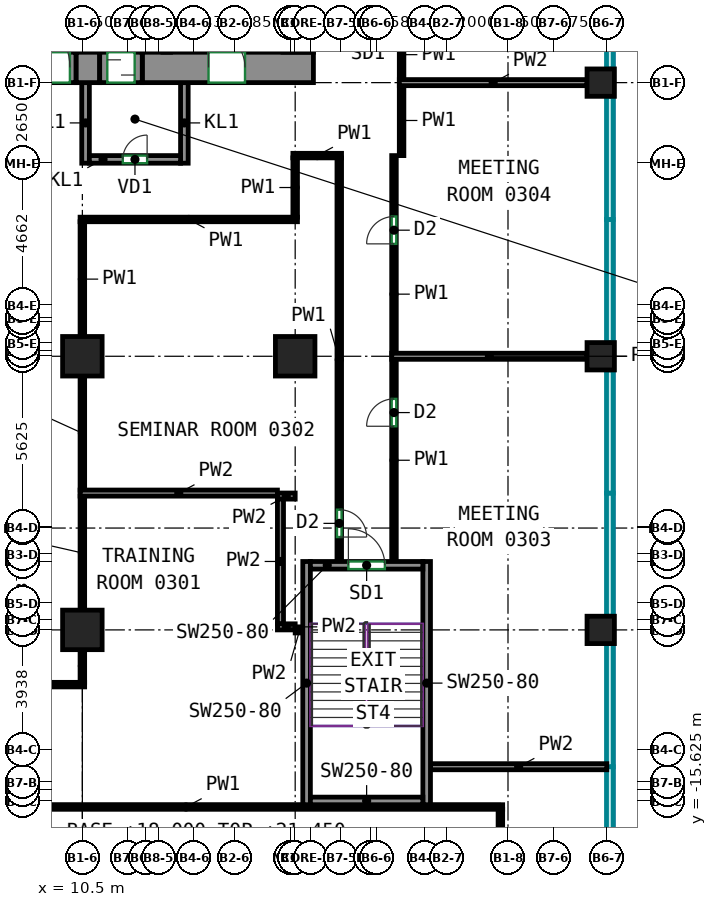
"""IFC4 building model, lengths in metres.
Left out: names, types, materials, properties, quantities, classifications, styles, units other than length and angle.
Written with IfcOpenShell. Run it as: python <this file> out.ifc"""

import sys

from ifc_helpers import new_model, si_unit, direction, frame, frame_2d, origin, origin_2d, place, context, subcontext, project, spatial, rectangle, extrude, source, transform, mapped, element, fill, save


model = new_model("IFC4")
c1 = context("Model", 3, precision=1e-05, world=origin(), true_north=direction((0.0, 1.0)))
c2 = subcontext(c1, "Body", "Model", "MODEL_VIEW")
j1 = project(units=[si_unit("LENGTHUNIT", "METRE"), si_unit("PLANEANGLEUNIT", "RADIAN")], contexts=[c1])
p1 = place(None, origin())
s1 = spatial("IfcSite", under=j1, at=p1, CompositionType="ELEMENT")
p2 = place(p1, origin())
s2 = spatial("IfcBuilding", under=s1, at=p2, CompositionType="ELEMENT")
p3 = place(p2, frame((0.0, 0.0, 18.0)))
s3 = spatial("IfcBuildingStorey", under=s2, at=p3, CompositionType="ELEMENT", Elevation=18.0)
m1 = source(origin(), c2, "Body", "SweptSolid", [
    extrude(rectangle(XDim=1.3, YDim=1.3, at=origin_2d()), origin(), (0.0, 0.0, 1.0), 4.1),
])
for number, where, z_axis, x_axis in (
    (1, (10.5, -10.0, 0.0), (0.0, 0.0, 1.0), (1.0, 0.0, 0.0)),
    (2, (10.5, -1.0, 0.0), (0.0, 0.0, 1.0), (1.0, 0.0, 0.0)),
    (3, (17.5, -1.0, 0.0), (0.0, 0.0, 1.0), (1.0, 0.0, 0.0)),
):
    element("IfcColumn", number, at=place(p3, frame(where, z_axis=z_axis, x_axis=x_axis)), inside=s3, PredefinedType="COLUMN", context=c2, shape_type="MappedRepresentation", body=[
        mapped(m1, transform((0.0, 0.0, 0.0))),
    ])
m2 = source(origin(), c2, "Body", "SweptSolid", [
    extrude(rectangle(XDim=0.9, YDim=0.9, at=origin_2d()), origin(), (0.0, 0.0, 1.0), 4.1),
])
for number, where, z_axis, x_axis in (
    (4, (27.55, -10.0, 0.0), (0.0, 0.0, 1.0), (1.0, 0.0, 0.0)),
    (5, (27.55, -1.0, 0.0), (0.0, 0.0, 1.0), (1.0, 0.0, 0.0)),
    (6, (27.55, 8.0, 0.0), (0.0, 0.0, 1.0), (1.0, 0.0, 0.0)),
):
    element("IfcColumn", number, at=place(p3, frame(where, z_axis=z_axis, x_axis=x_axis)), inside=s3, PredefinedType="COLUMN", context=c2, shape_type="MappedRepresentation", body=[
        mapped(m2, transform((0.0, 0.0, 0.0))),
    ])
m3 = source(origin(), c2, "Body", "SweptSolid", [
    extrude(rectangle(XDim=0.78, YDim=1.0, at=frame_2d((0.39, 0.0))), origin(), (0.0, 0.0, 1.0), 4.1),
])
p4 = place(p3, frame((10.29, 8.5, 0.0), z_axis=(0.0, 0.0, 1.0), x_axis=(1.0, 0.0, 0.0)))
e7 = element("IfcWall", 7, at=p4, inside=s3, PredefinedType="SHEAR", context=c2, shape_type="MappedRepresentation", body=[
    mapped(m3, transform((0.0, 0.0, 0.0))),
])
m4 = source(origin(), c2, "Body", "SweptSolid", [
    extrude(rectangle(XDim=5.63, YDim=1.0, at=frame_2d((2.815, 0.0))), origin(), (0.0, 0.0, 1.0), 4.1),
])
p5 = place(p3, frame((12.47, 8.5, 0.0), z_axis=(0.0, 0.0, 1.0), x_axis=(1.0, 0.0, 0.0)))
e8 = element("IfcWall", 8, at=p5, inside=s3, PredefinedType="SHEAR", context=c2, shape_type="MappedRepresentation", body=[
    mapped(m4, transform((0.0, 0.0, 0.0))),
])
p6 = place(p5, frame((2.18, 0.0, 0.0)))
e9 = element("IfcOpeningElement", 9, at=p6, cuts=e8, PredefinedType="OPENING", context=c2, shape_type="SweptSolid", body=[
    extrude(rectangle(XDim=1.2, YDim=2.1, at=frame_2d((0.6, 1.05))), frame((0.0, 0.51, 0.0), z_axis=(0.0, -1.0, 0.0), x_axis=(1.0, 0.0, 0.0)), (0.0, 0.0, 1.0), 1.02),
])
m5 = source(origin(), c2, "Body", "SweptSolid", [
    extrude(rectangle(XDim=8.0, YDim=0.25, at=frame_2d((4.0, 0.0))), origin(), (0.0, 0.0, 1.0), 4.1),
])
for number, where, z_axis, x_axis in (
    (10, (17.875, -15.75, 0.0), (0.0, 0.0, 1.0), (0.0, 1.0, 0.0)),
    (11, (21.825, -15.75, 0.0), (0.0, 0.0, 1.0), (0.0, 1.0, 0.0)),
):
    element("IfcWall", number, at=place(p3, frame(where, z_axis=z_axis, x_axis=x_axis)), inside=s3, PredefinedType="SHEAR", context=c2, shape_type="MappedRepresentation", body=[
        mapped(m5, transform((0.0, 0.0, 0.0))),
    ])
m6 = source(origin(), c2, "Body", "SweptSolid", [
    extrude(rectangle(XDim=3.7, YDim=0.25, at=frame_2d((1.85, 0.0))), origin(), (0.0, 0.0, 1.0), 4.1),
])
p7 = place(p3, frame((18.0, -15.625, 0.0), z_axis=(0.0, 0.0, 1.0), x_axis=(1.0, 0.0, 0.0)))
e12 = element("IfcWall", 12, at=p7, inside=s3, PredefinedType="SHEAR", context=c2, shape_type="MappedRepresentation", body=[
    mapped(m6, transform((0.0, 0.0, 0.0))),
])
p8 = place(p3, frame((18.0, -7.875, 0.0), z_axis=(0.0, 0.0, 1.0), x_axis=(1.0, 0.0, 0.0)))
e13 = element("IfcWall", 13, at=p8, inside=s3, PredefinedType="SHEAR", context=c2, shape_type="MappedRepresentation", body=[
    mapped(m6, transform((0.0, 0.0, 0.0))),
])
p9 = place(p8, frame((1.25, 0.0, 0.0)))
e14 = element("IfcOpeningElement", 14, at=p9, cuts=e13, PredefinedType="OPENING", context=c2, shape_type="SweptSolid", body=[
    extrude(rectangle(XDim=1.2, YDim=2.1, at=frame_2d((0.6, 1.05))), frame((0.0, 0.135, 0.0), z_axis=(0.0, -1.0, 0.0), x_axis=(1.0, 0.0, 0.0)), (0.0, 0.0, 1.0), 0.27),
])
m7 = source(origin(), c2, "Body", "SweptSolid", [
    extrude(rectangle(XDim=2.65, YDim=0.25, at=frame_2d((1.325, 0.0))), origin(), (0.0, 0.0, 1.0), 4.1),
])
for number, where, z_axis, x_axis in (
    (15, (10.605, 5.35, 0.0), (0.0, 0.0, 1.0), (0.0, 1.0, 0.0)),
    (16, (13.855, 5.35, 0.0), (0.0, 0.0, 1.0), (0.0, 1.0, 0.0)),
):
    element("IfcWall", number, at=place(p3, frame(where, z_axis=z_axis, x_axis=x_axis)), inside=s3, PredefinedType="PARTITIONING", context=c2, shape_type="MappedRepresentation", body=[
        mapped(m7, transform((0.0, 0.0, 0.0))),
    ])
m8 = source(origin(), c2, "Body", "SweptSolid", [
    extrude(rectangle(XDim=3.0, YDim=0.25, at=frame_2d((1.5, 0.0))), origin(), (0.0, 0.0, 1.0), 4.1),
])
p10 = place(p3, frame((10.73, 5.475, 0.0), z_axis=(0.0, 0.0, 1.0), x_axis=(1.0, 0.0, 0.0)))
e17 = element("IfcWall", 17, at=p10, inside=s3, PredefinedType="PARTITIONING", context=c2, shape_type="MappedRepresentation", body=[
    mapped(m8, transform((0.0, 0.0, 0.0))),
])
p11 = place(p10, frame((1.1, 0.0, 0.0)))
e18 = element("IfcOpeningElement", 18, at=p11, cuts=e17, PredefinedType="OPENING", context=c2, shape_type="SweptSolid", body=[
    extrude(rectangle(XDim=0.8, YDim=2.0, at=frame_2d((0.4, 1.0))), frame((0.0, 0.135, 0.0), z_axis=(0.0, -1.0, 0.0), x_axis=(1.0, 0.0, 0.0)), (0.0, 0.0, 1.0), 0.27),
])
m9 = source(origin(), c2, "Body", "SweptSolid", [
    extrude(rectangle(XDim=2.4, YDim=1.0, at=frame_2d((1.2, 0.0))), origin(), (0.0, 0.0, 1.0), 2.7),
])
p12 = place(p3, frame((7.89, 8.5, 0.0), z_axis=(0.0, 0.0, 1.0), x_axis=(1.0, 0.0, 0.0)))
e19 = element("IfcWall", 19, at=p12, inside=s3, PredefinedType="PARTITIONING", context=c2, shape_type="MappedRepresentation", body=[
    mapped(m9, transform((0.0, 0.0, 0.0))),
])
p13 = place(p12, frame((0.2, 0.0, 0.0)))
e20 = element("IfcOpeningElement", 20, at=p13, cuts=e19, PredefinedType="OPENING", context=c2, shape_type="SweptSolid", body=[
    extrude(rectangle(XDim=2.0, YDim=2.1, at=frame_2d((1.0, 1.05))), frame((0.0, 0.51, 0.0), z_axis=(0.0, -1.0, 0.0), x_axis=(1.0, 0.0, 0.0)), (0.0, 0.0, 1.0), 1.02),
])
m10 = source(origin(), c2, "Body", "SweptSolid", [
    extrude(rectangle(XDim=1.4, YDim=1.0, at=frame_2d((0.7, 0.0))), origin(), (0.0, 0.0, 1.0), 2.7),
])
p14 = place(p3, frame((11.07, 8.5, 0.0), z_axis=(0.0, 0.0, 1.0), x_axis=(1.0, 0.0, 0.0)))
e21 = element("IfcWall", 21, at=p14, inside=s3, PredefinedType="PARTITIONING", context=c2, shape_type="MappedRepresentation", body=[
    mapped(m10, transform((0.0, 0.0, 0.0))),
])
p15 = place(p14, frame((0.25, 0.0, 0.0)))
e22 = element("IfcOpeningElement", 22, at=p15, cuts=e21, PredefinedType="OPENING", context=c2, shape_type="SweptSolid", body=[
    extrude(rectangle(XDim=0.9, YDim=2.1, at=frame_2d((0.45, 1.05))), frame((0.0, 0.51, 0.0), z_axis=(0.0, -1.0, 0.0), x_axis=(1.0, 0.0, 0.0)), (0.0, 0.0, 1.0), 1.02),
])
p16 = place(p3, frame((-5.875, -11.8, 0.0), z_axis=(0.0, 0.0, 1.0), x_axis=(1.0, 0.0, 0.0)))
e23 = element("IfcWall", 23, at=p16, inside=s3, PredefinedType="PARTITIONING", context=c2, shape_type="SweptSolid", body=[
    extrude(rectangle(XDim=16.45, YDim=0.15, at=frame_2d((8.225, 0.0))), origin(), (0.0, 0.0, 1.0), 4.1),
])
p17 = place(p16, frame((0.811, 0.0, 0.0)))
e24 = element("IfcOpeningElement", 24, at=p17, cuts=e23, PredefinedType="OPENING", context=c2, shape_type="SweptSolid", body=[
    extrude(rectangle(XDim=0.9, YDim=2.1, at=frame_2d((0.45, 1.05))), frame((0.0, 0.085, 0.0), z_axis=(0.0, -1.0, 0.0), x_axis=(1.0, 0.0, 0.0)), (0.0, 0.0, 1.0), 0.17),
])
p18 = place(p16, frame((7.771, 0.0, 0.0)))
e25 = element("IfcOpeningElement", 25, at=p18, cuts=e23, PredefinedType="OPENING", context=c2, shape_type="SweptSolid", body=[
    extrude(rectangle(XDim=0.9, YDim=2.1, at=frame_2d((0.45, 1.05))), frame((0.0, 0.085, 0.0), z_axis=(0.0, -1.0, 0.0), x_axis=(1.0, 0.0, 0.0)), (0.0, 0.0, 1.0), 0.17),
])
p19 = place(p3, frame((10.5, -9.35, 0.0), z_axis=(0.0, 0.0, 1.0), x_axis=(0.0, 1.0, 0.0)))
e26 = element("IfcWall", 26, at=p19, inside=s3, PredefinedType="PARTITIONING", context=c2, shape_type="SweptSolid", body=[
    extrude(rectangle(XDim=3.76, YDim=0.15, at=frame_2d((1.88, 0.0))), origin(), (0.0, 0.0, 1.0), 3.45),
])
p20 = place(p3, frame((10.5, -11.725, 0.0), z_axis=(0.0, 0.0, 1.0), x_axis=(0.0, 1.0, 0.0)))
e27 = element("IfcWall", 27, at=p20, inside=s3, PredefinedType="PARTITIONING", context=c2, shape_type="SweptSolid", body=[
    extrude(rectangle(XDim=1.075, YDim=0.15, at=frame_2d((0.538, 0.0))), origin(), (0.0, 0.0, 1.0), 3.45),
])
p21 = place(p3, frame((3.49, -15.825, 0.0), z_axis=(0.0, 0.0, 1.0), x_axis=(1.0, 0.0, 0.0)))
e28 = element("IfcWall", 28, at=p21, inside=s3, PredefinedType="PARTITIONING", context=c2, shape_type="SweptSolid", body=[
    extrude(rectangle(XDim=20.835, YDim=0.15, at=frame_2d((10.417, 0.0))), origin(), (0.0, 0.0, 1.0), 4.1),
])
p22 = place(p21, frame((2.402, 0.0, 0.0)))
e29 = element("IfcOpeningElement", 29, at=p22, cuts=e28, PredefinedType="OPENING", context=c2, shape_type="SweptSolid", body=[
    extrude(rectangle(XDim=0.9, YDim=2.1, at=frame_2d((0.45, 1.05))), frame((0.0, 0.085, 0.0), z_axis=(0.0, -1.0, 0.0), x_axis=(1.0, 0.0, 0.0)), (0.0, 0.0, 1.0), 0.17),
])
p23 = place(p3, frame((24.25, -18.125, 0.0), z_axis=(0.0, 0.0, 1.0), x_axis=(0.0, 1.0, 0.0)))
e30 = element("IfcWall", 30, at=p23, inside=s3, PredefinedType="PARTITIONING", context=c2, shape_type="SweptSolid", body=[
    extrude(rectangle(XDim=2.225, YDim=0.15, at=frame_2d((1.113, 0.0))), origin(), (0.0, 0.0, 1.0), 3.45),
])
p24 = place(p3, frame((20.75, -7.75, 0.0), z_axis=(0.0, 0.0, 1.0), x_axis=(0.0, 1.0, 0.0)))
e31 = element("IfcWall", 31, at=p24, inside=s3, PredefinedType="PARTITIONING", context=c2, shape_type="SweptSolid", body=[
    extrude(rectangle(XDim=6.66, YDim=0.15, at=frame_2d((3.33, 0.0))), origin(), (0.0, 0.0, 1.0), 4.1),
])
p25 = place(p24, frame((4.448, 0.0, 0.0)))
e32 = element("IfcOpeningElement", 32, at=p25, cuts=e31, PredefinedType="OPENING", context=c2, shape_type="SweptSolid", body=[
    extrude(rectangle(XDim=0.9, YDim=2.1, at=frame_2d((0.45, 1.05))), frame((0.0, 0.085, 0.0), z_axis=(0.0, -1.0, 0.0), x_axis=(1.0, 0.0, 0.0)), (0.0, 0.0, 1.0), 0.17),
])
p26 = place(p3, frame((10.5, -0.35, 0.0), z_axis=(0.0, 0.0, 1.0), x_axis=(0.0, 1.0, 0.0)))
e33 = element("IfcWall", 33, at=p26, inside=s3, PredefinedType="PARTITIONING", context=c2, shape_type="SweptSolid", body=[
    extrude(rectangle(XDim=3.775, YDim=0.15, at=frame_2d((1.888, 0.0))), origin(), (0.0, 0.0, 1.0), 4.1),
])
p27 = place(p3, frame((10.5, -5.41, 0.0), z_axis=(0.0, 0.0, 1.0), x_axis=(0.0, 1.0, 0.0)))
e34 = element("IfcWall", 34, at=p27, inside=s3, PredefinedType="PARTITIONING", context=c2, shape_type="SweptSolid", body=[
    extrude(rectangle(XDim=3.76, YDim=0.15, at=frame_2d((1.88, 0.0))), origin(), (0.0, 0.0, 1.0), 3.45),
])
p28 = place(p3, frame((18.95, 5.525, 0.0), z_axis=(0.0, 0.0, 1.0), x_axis=(0.0, -1.0, 0.0)))
e35 = element("IfcWall", 35, at=p28, inside=s3, PredefinedType="PARTITIONING", context=c2, shape_type="SweptSolid", body=[
    extrude(rectangle(XDim=13.275, YDim=0.15, at=frame_2d((6.637, 0.0))), origin(), (0.0, 0.0, 1.0), 4.1),
])
p29 = place(p28, frame((11.571, 0.0, 0.0)))
e36 = element("IfcOpeningElement", 36, at=p29, cuts=e35, PredefinedType="OPENING", context=c2, shape_type="SweptSolid", body=[
    extrude(rectangle(XDim=0.9, YDim=2.1, at=frame_2d((0.45, 1.05))), frame((0.0, 0.085, 0.0), z_axis=(0.0, -1.0, 0.0), x_axis=(1.0, 0.0, 0.0)), (0.0, 0.0, 1.0), 0.17),
])
p30 = place(p3, frame((17.425, 5.6, 0.0), z_axis=(0.0, 0.0, 1.0), x_axis=(1.0, 0.0, 0.0)))
e37 = element("IfcWall", 37, at=p30, inside=s3, PredefinedType="PARTITIONING", context=c2, shape_type="SweptSolid", body=[
    extrude(rectangle(XDim=1.6, YDim=0.15, at=frame_2d((0.8, 0.0))), origin(), (0.0, 0.0, 1.0), 4.1),
])
p31 = place(p3, frame((17.5, 3.575, 0.0), z_axis=(0.0, 0.0, 1.0), x_axis=(0.0, 1.0, 0.0)))
e38 = element("IfcWall", 38, at=p31, inside=s3, PredefinedType="PARTITIONING", context=c2, shape_type="SweptSolid", body=[
    extrude(rectangle(XDim=1.95, YDim=0.15, at=frame_2d((0.975, 0.0))), origin(), (0.0, 0.0, 1.0), 4.1),
])
p32 = place(p3, frame((10.425, 3.5, 0.0), z_axis=(0.0, 0.0, 1.0), x_axis=(1.0, 0.0, 0.0)))
e39 = element("IfcWall", 39, at=p32, inside=s3, PredefinedType="PARTITIONING", context=c2, shape_type="SweptSolid", body=[
    extrude(rectangle(XDim=7.15, YDim=0.15, at=frame_2d((3.575, 0.0))), origin(), (0.0, 0.0, 1.0), 4.1),
])
p33 = place(p3, frame((21.0, 5.6, 0.0), z_axis=(0.0, 0.0, 1.0), x_axis=(0.0, 1.0, 0.0)))
e40 = element("IfcWall", 40, at=p33, inside=s3, PredefinedType="PARTITIONING", context=c2, shape_type="SweptSolid", body=[
    extrude(rectangle(XDim=2.31, YDim=0.15, at=frame_2d((1.155, 0.0))), origin(), (0.0, 0.0, 1.0), 4.1),
])
p34 = place(p3, frame((20.75, -0.91, 0.0), z_axis=(0.0, 0.0, 1.0), x_axis=(0.0, 1.0, 0.0)))
e41 = element("IfcWall", 41, at=p34, inside=s3, PredefinedType="PARTITIONING", context=c2, shape_type="SweptSolid", body=[
    extrude(rectangle(XDim=6.51, YDim=0.15, at=frame_2d((3.255, 0.0))), origin(), (0.0, 0.0, 1.0), 4.1),
])
p35 = place(p34, frame((3.607, 0.0, 0.0)))
e42 = element("IfcOpeningElement", 42, at=p35, cuts=e41, PredefinedType="OPENING", context=c2, shape_type="SweptSolid", body=[
    extrude(rectangle(XDim=0.9, YDim=2.1, at=frame_2d((0.45, 1.05))), frame((0.0, 0.085, 0.0), z_axis=(0.0, -1.0, 0.0), x_axis=(1.0, 0.0, 0.0)), (0.0, 0.0, 1.0), 0.17),
])
p36 = place(p3, frame((21.0, 8.09, 0.0), z_axis=(0.0, 0.0, 1.0), x_axis=(0.0, 1.0, 0.0)))
e43 = element("IfcWall", 43, at=p36, inside=s3, PredefinedType="PARTITIONING", context=c2, shape_type="SweptSolid", body=[
    extrude(rectangle(XDim=1.66, YDim=0.15, at=frame_2d((0.83, 0.0))), origin(), (0.0, 0.0, 1.0), 4.1),
])
p37 = place(p3, frame((10.426, -5.5, 0.0), z_axis=(0.0, 0.0, 1.0), x_axis=(1.0, 0.0, 0.0)))
e44 = element("IfcWall", 44, at=p37, inside=s3, PredefinedType="PARTITIONING", context=c2, shape_type="SweptSolid", body=[
    extrude(rectangle(XDim=6.49, YDim=0.2, at=frame_2d((3.245, 0.0))), origin(), (0.0, 0.0, 1.0), 4.1),
])
p38 = place(p3, frame((16.916, -5.598, 0.0), z_axis=(0.0, 0.0, 1.0), x_axis=(1.0, 0.0, 0.0)))
e45 = element("IfcWall", 45, at=p38, inside=s3, PredefinedType="PARTITIONING", context=c2, shape_type="SweptSolid", body=[
    extrude(rectangle(XDim=0.584, YDim=0.2, at=frame_2d((0.292, 0.0))), origin(), (0.0, 0.0, 1.0), 4.1),
])
p39 = place(p3, frame((17.016, -9.8, 0.0), z_axis=(0.0, 0.0, 1.0), x_axis=(0.0, 1.0, 0.0)))
e46 = element("IfcWall", 46, at=p39, inside=s3, PredefinedType="PARTITIONING", context=c2, shape_type="SweptSolid", body=[
    extrude(rectangle(XDim=4.102, YDim=0.2, at=frame_2d((2.051, 0.0))), origin(), (0.0, 0.0, 1.0), 4.1),
])
p40 = place(p3, frame((17.5, -9.9, 0.0), z_axis=(0.0, 0.0, 1.0), x_axis=(-1.0, 0.0, 0.0)))
e47 = element("IfcWall", 47, at=p40, inside=s3, PredefinedType="PARTITIONING", context=c2, shape_type="SweptSolid", body=[
    extrude(rectangle(XDim=0.584, YDim=0.2, at=frame_2d((0.292, 0.0))), origin(), (0.0, 0.0, 1.0), 4.1),
])
p41 = place(p3, frame((17.8, -10.0, 0.0), z_axis=(0.0, 0.0, 1.0), x_axis=(-1.0, 0.0, 0.0)))
e48 = element("IfcWall", 48, at=p41, inside=s3, PredefinedType="PARTITIONING", context=c2, shape_type="SweptSolid", body=[
    extrude(rectangle(XDim=0.3, YDim=0.2, at=frame_2d((0.15, 0.0))), origin(), (0.0, 0.0, 1.0), 4.1),
])
p42 = place(p3, frame((21.95, -14.5, 0.0), z_axis=(0.0, 0.0, 1.0), x_axis=(1.0, 0.0, 0.0)))
e49 = element("IfcWall", 49, at=p42, inside=s3, PredefinedType="PARTITIONING", context=c2, shape_type="SweptSolid", body=[
    extrude(rectangle(XDim=5.8, YDim=0.2, at=frame_2d((2.9, 0.0))), origin(), (0.0, 0.0, 1.0), 4.1),
])
p43 = place(p3, frame((27.1, -1.0, 0.0), z_axis=(0.0, 0.0, 1.0), x_axis=(-1.0, 0.0, 0.0)))
e50 = element("IfcWall", 50, at=p43, inside=s3, PredefinedType="PARTITIONING", context=c2, shape_type="SweptSolid", body=[
    extrude(rectangle(XDim=6.424, YDim=0.2, at=frame_2d((3.212, 0.0))), origin(), (0.0, 0.0, 1.0), 3.45),
])
p44 = place(p3, frame((20.926, 8.0, 0.0), z_axis=(0.0, 0.0, 1.0), x_axis=(1.0, 0.0, 0.0)))
e51 = element("IfcWall", 51, at=p44, inside=s3, PredefinedType="PARTITIONING", context=c2, shape_type="SweptSolid", body=[
    extrude(rectangle(XDim=6.174, YDim=0.2, at=frame_2d((3.087, 0.0))), origin(), (0.0, 0.0, 1.0), 4.1),
])
p45 = place(p13, origin())
e52 = element("IfcDoor", 52, at=p45, inside=s3, OperationType="DOUBLE_DOOR_SINGLE_SWING", PredefinedType="DOOR", context=c2, shape_type="SweptSolid", body=[
    extrude(rectangle(XDim=2.0, YDim=2.1, at=frame_2d((1.0, 1.05))), frame((0.0, 0.405, 0.0), z_axis=(0.0, -1.0, 0.0), x_axis=(1.0, 0.0, 0.0)), (0.0, 0.0, 1.0), 0.05),
])
fill(e20, e52)
p46 = place(p11, origin())
e53 = element("IfcDoor", 53, at=p46, inside=s3, OperationType="SINGLE_SWING_RIGHT", PredefinedType="DOOR", context=c2, shape_type="SweptSolid", body=[
    extrude(rectangle(XDim=0.8, YDim=2.0, at=frame_2d((0.4, 1.0))), frame((0.0, 0.025, 0.0), z_axis=(0.0, -1.0, 0.0), x_axis=(1.0, 0.0, 0.0)), (0.0, 0.0, 1.0), 0.05),
])
fill(e18, e53)
p47 = place(p15, origin())
e54 = element("IfcDoor", 54, at=p47, inside=s3, OperationType="SLIDING_TO_LEFT", PredefinedType="DOOR", context=c2, shape_type="SweptSolid", body=[
    extrude(rectangle(XDim=0.9, YDim=2.1, at=frame_2d((0.45, 1.05))), frame((0.0, 0.405, 0.0), z_axis=(0.0, -1.0, 0.0), x_axis=(1.0, 0.0, 0.0)), (0.0, 0.0, 1.0), 0.05),
])
fill(e22, e54)
p48 = place(p6, origin())
e55 = element("IfcDoor", 55, at=p48, inside=s3, OperationType="DOUBLE_DOOR_SINGLE_SWING", PredefinedType="DOOR", context=c2, shape_type="SweptSolid", body=[
    extrude(rectangle(XDim=1.2, YDim=2.1, at=frame_2d((0.6, 1.05))), frame((0.0, 0.405, 0.0), z_axis=(0.0, -1.0, 0.0), x_axis=(1.0, 0.0, 0.0)), (0.0, 0.0, 1.0), 0.05),
])
fill(e9, e55)
p49 = place(p9, origin())
e56 = element("IfcDoor", 56, at=p49, inside=s3, OperationType="DOUBLE_DOOR_SINGLE_SWING", PredefinedType="DOOR", context=c2, shape_type="SweptSolid", body=[
    extrude(rectangle(XDim=1.2, YDim=2.1, at=frame_2d((0.6, 1.05))), frame((0.0, 0.025, 0.0), z_axis=(0.0, -1.0, 0.0), x_axis=(1.0, 0.0, 0.0)), (0.0, 0.0, 1.0), 0.05),
])
fill(e14, e56)
p50 = place(p29, origin())
e57 = element("IfcDoor", 57, at=p50, inside=s3, OperationType="SINGLE_SWING_RIGHT", PredefinedType="DOOR", context=c2, shape_type="SweptSolid", body=[
    extrude(rectangle(XDim=0.9, YDim=2.1, at=frame_2d((0.45, 1.05))), frame((0.0, 0.025, 0.0), z_axis=(0.0, -1.0, 0.0), x_axis=(1.0, 0.0, 0.0)), (0.0, 0.0, 1.0), 0.05),
])
fill(e36, e57)
p51 = place(p25, origin())
e58 = element("IfcDoor", 58, at=p51, inside=s3, OperationType="SINGLE_SWING_LEFT", PredefinedType="DOOR", context=c2, shape_type="SweptSolid", body=[
    extrude(rectangle(XDim=0.9, YDim=2.1, at=frame_2d((0.45, 1.05))), frame((0.0, 0.025, 0.0), z_axis=(0.0, -1.0, 0.0), x_axis=(1.0, 0.0, 0.0)), (0.0, 0.0, 1.0), 0.05),
])
fill(e32, e58)
p52 = place(p35, origin())
e59 = element("IfcDoor", 59, at=p52, inside=s3, OperationType="SINGLE_SWING_LEFT", PredefinedType="DOOR", context=c2, shape_type="SweptSolid", body=[
    extrude(rectangle(XDim=0.9, YDim=2.1, at=frame_2d((0.45, 1.05))), frame((0.0, 0.025, 0.0), z_axis=(0.0, -1.0, 0.0), x_axis=(1.0, 0.0, 0.0)), (0.0, 0.0, 1.0), 0.05),
])
fill(e42, e59)
save(model, sys.argv[1])
